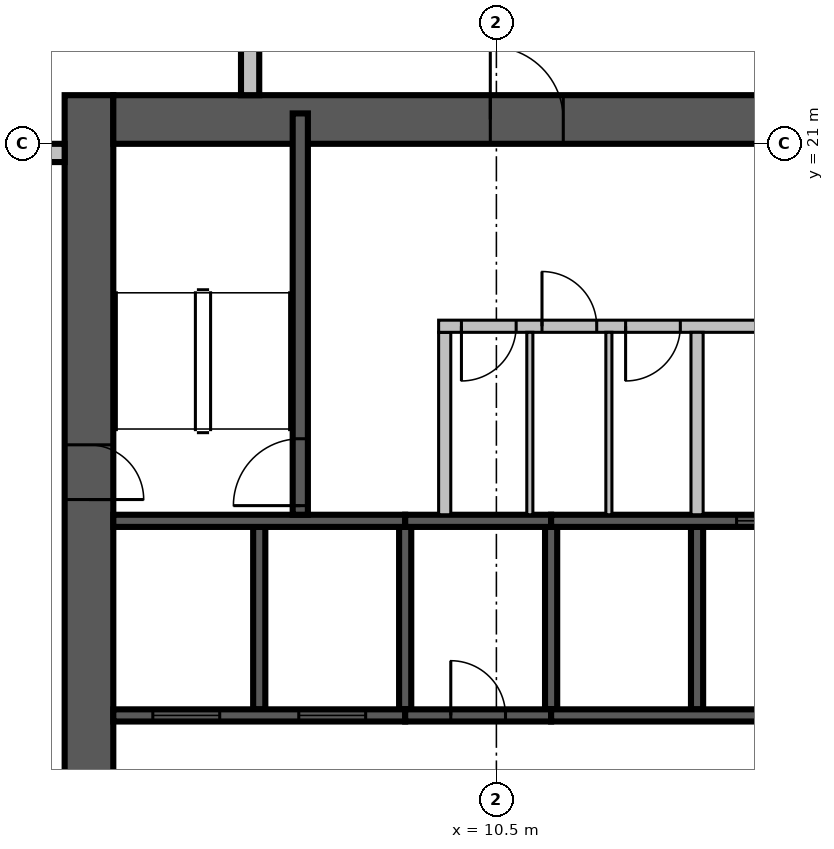
"""IFC4 building model, lengths in metres.
Left out: names, types, materials, properties, quantities, classifications, styles, units other than length and angle.
Written with IfcOpenShell. Run it as: python <this file> out.ifc"""

import sys

from ifc_helpers import new_model, si_unit, direction, frame, frame_2d, origin, place, context, subcontext, project, spatial, rectangle, extrude, source, transform, mapped, element, fill, save


model = new_model("IFC4")
c1 = context("Model", 3, precision=1e-05, world=origin(), true_north=direction((0.0, 1.0)))
c2 = subcontext(c1, "Body", "Model", "MODEL_VIEW")
j1 = project(units=[si_unit("LENGTHUNIT", "METRE"), si_unit("PLANEANGLEUNIT", "RADIAN")], contexts=[c1])
p1 = place(None, origin())
s1 = spatial("IfcSite", under=j1, at=p1, CompositionType="ELEMENT")
p2 = place(p1, origin())
s2 = spatial("IfcBuilding", under=s1, at=p2, CompositionType="ELEMENT")
p3 = place(p2, frame((0.0, 0.0, 219.6)))
s3 = spatial("IfcBuildingStorey", under=s2, at=p3, CompositionType="ELEMENT", Elevation=219.6)
m1 = source(origin(), c2, "Body", "SweptSolid", [
    extrude(rectangle(XDim=17.6, YDim=0.8, at=frame_2d((8.8, 0.0))), origin(), (0.0, 0.0, 1.0), 3.8),
])
p4 = place(p3, frame((3.8, 4.2, 0.0), z_axis=(0.0, 0.0, 1.0), x_axis=(0.0, 1.0, 0.0)))
e1 = element("IfcWall", 1, at=p4, inside=s3, PredefinedType="SHEAR", context=c2, shape_type="MappedRepresentation", body=[
    mapped(m1, transform((0.0, 0.0, 0.0), scale=1.0)),
])
m2 = source(origin(), c2, "Body", "SweptSolid", [
    extrude(rectangle(XDim=2.2, YDim=2.1, at=frame_2d((1.1, 1.05))), frame((0.0, 0.41, 0.0), z_axis=(0.0, -1.0, 0.0), x_axis=(1.0, 0.0, 0.0)), (0.0, 0.0, 1.0), 0.82),
])
p5 = place(p4, frame((4.2, 0.0, 0.0)))
e2 = element("IfcOpeningElement", 2, at=p5, cuts=e1, PredefinedType="OPENING", context=c2, shape_type="MappedRepresentation", body=[
    mapped(m2, transform((0.0, 0.0, 0.0), scale=1.0)),
])
m3 = source(origin(), c2, "Body", "SweptSolid", [
    extrude(rectangle(XDim=0.9, YDim=2.1, at=frame_2d((0.45, 1.05))), frame((0.0, 0.41, 0.0), z_axis=(0.0, -1.0, 0.0), x_axis=(1.0, 0.0, 0.0)), (0.0, 0.0, 1.0), 0.82),
])
p6 = place(p4, frame((10.95, 0.0, 0.0)))
e3 = element("IfcOpeningElement", 3, at=p6, cuts=e1, PredefinedType="OPENING", context=c2, shape_type="MappedRepresentation", body=[
    mapped(m3, transform((0.0, 0.0, 0.0), scale=1.0)),
])
m4 = source(origin(), c2, "Body", "SweptSolid", [
    extrude(rectangle(XDim=16.8, YDim=0.8, at=frame_2d((8.4, 0.0))), origin(), (0.0, 0.0, 1.0), 3.8),
])
p7 = place(p3, frame((4.2, 21.4, 0.0), z_axis=(0.0, 0.0, 1.0), x_axis=(1.0, 0.0, 0.0)))
e4 = element("IfcWall", 4, at=p7, inside=s3, PredefinedType="SHEAR", context=c2, shape_type="MappedRepresentation", body=[
    mapped(m4, transform((0.0, 0.0, 0.0), scale=1.0)),
])
m5 = source(origin(), c2, "Body", "SweptSolid", [
    extrude(rectangle(XDim=1.2, YDim=2.1, at=frame_2d((0.6, 1.05))), frame((0.0, 0.41, 0.0), z_axis=(0.0, -1.0, 0.0), x_axis=(1.0, 0.0, 0.0)), (0.0, 0.0, 1.0), 0.82),
])
p8 = place(p7, frame((6.2, 0.0, 0.0)))
e5 = element("IfcOpeningElement", 5, at=p8, cuts=e4, PredefinedType="OPENING", context=c2, shape_type="MappedRepresentation", body=[
    mapped(m5, transform((0.0, 0.0, 0.0), scale=1.0)),
])
m6 = source(origin(), c2, "Body", "SweptSolid", [
    extrude(rectangle(XDim=16.6, YDim=0.3, at=frame_2d((8.3, 0.0))), origin(), (0.0, 0.0, 1.0), 3.4),
])
p9 = place(p3, frame((6.45, 38.4, 0.0), z_axis=(0.0, 0.0, 1.0), x_axis=(0.0, -1.0, 0.0)))
e6 = element("IfcWall", 6, at=p9, inside=s3, PredefinedType="STANDARD", context=c2, shape_type="MappedRepresentation", body=[
    mapped(m6, transform((0.0, 0.0, 0.0), scale=1.0)),
])
m7 = source(origin(), c2, "Body", "SweptSolid", [
    extrude(rectangle(XDim=1.8, YDim=2.3, at=frame_2d((0.9, 1.15))), frame((0.0, 0.16, 0.0), z_axis=(0.0, -1.0, 0.0), x_axis=(1.0, 0.0, 0.0)), (0.0, 0.0, 1.0), 0.32),
])
p10 = place(p9, frame((1.15, 0.0, 0.6)))
e7 = element("IfcOpeningElement", 7, at=p10, cuts=e6, PredefinedType="OPENING", context=c2, shape_type="MappedRepresentation", body=[
    mapped(m7, transform((0.0, 0.0, 0.0), scale=1.0)),
])
p11 = place(p9, frame((9.438, 0.0, 0.6)))
e8 = element("IfcOpeningElement", 8, at=p11, cuts=e6, PredefinedType="OPENING", context=c2, shape_type="MappedRepresentation", body=[
    mapped(m7, transform((0.0, 0.0, 0.0), scale=1.0)),
])
m8 = source(origin(), c2, "Body", "SweptSolid", [
    extrude(rectangle(XDim=1.2, YDim=2.3, at=frame_2d((0.6, 1.15))), frame((0.0, 0.16, 0.0), z_axis=(0.0, -1.0, 0.0), x_axis=(1.0, 0.0, 0.0)), (0.0, 0.0, 1.0), 0.32),
])
p12 = place(p9, frame((14.338, 0.0, 0.6)))
e9 = element("IfcOpeningElement", 9, at=p12, cuts=e6, PredefinedType="OPENING", context=c2, shape_type="MappedRepresentation", body=[
    mapped(m8, transform((0.0, 0.0, 0.0), scale=1.0)),
])
p13 = place(p9, frame((11.887, 0.0, 0.6)))
e10 = element("IfcOpeningElement", 10, at=p13, cuts=e6, PredefinedType="OPENING", context=c2, shape_type="MappedRepresentation", body=[
    mapped(m7, transform((0.0, 0.0, 0.0), scale=1.0)),
])
m9 = source(origin(), c2, "Body", "SweptSolid", [
    extrude(rectangle(XDim=1.0, YDim=2.1, at=frame_2d((0.5, 1.05))), frame((0.0, 0.16, 0.0), z_axis=(0.0, -1.0, 0.0), x_axis=(1.0, 0.0, 0.0)), (0.0, 0.0, 1.0), 0.32),
])
p14 = place(p9, frame((5.908, 0.0, 0.0)))
e11 = element("IfcOpeningElement", 11, at=p14, cuts=e6, PredefinedType="OPENING", context=c2, shape_type="MappedRepresentation", body=[
    mapped(m9, transform((0.0, 0.0, 0.0), scale=1.0)),
])
m10 = source(origin(), c2, "Body", "SweptSolid", [
    extrude(rectangle(XDim=2.5, YDim=0.3, at=frame_2d((1.25, 0.0))), origin(), (0.0, 0.0, 1.0), 3.4),
])
p15 = place(p3, frame((3.4, 20.85, 0.0), z_axis=(0.0, 0.0, 1.0), x_axis=(-1.0, 0.0, 0.0)))
e12 = element("IfcWall", 12, at=p15, inside=s3, PredefinedType="STANDARD", context=c2, shape_type="MappedRepresentation", body=[
    mapped(m10, transform((0.0, 0.0, 0.0), scale=1.0)),
])
p16 = place(p15, frame((0.4, 0.0, 0.6)))
e13 = element("IfcOpeningElement", 13, at=p16, cuts=e12, PredefinedType="OPENING", context=c2, shape_type="MappedRepresentation", body=[
    mapped(m7, transform((0.0, 0.0, 0.0), scale=1.0)),
])
m11 = source(origin(), c2, "Body", "SweptSolid", [
    extrude(rectangle(XDim=3.0, YDim=0.2, at=frame_2d((1.5, 0.0))), origin(), (0.0, 0.0, 1.0), 3.8),
])
p17 = place(p3, frame((6.6, 11.7, 0.0), z_axis=(0.0, 0.0, 1.0), x_axis=(0.0, 1.0, 0.0)))
e14 = element("IfcWall", 14, at=p17, inside=s3, PredefinedType="SOLIDWALL", context=c2, shape_type="MappedRepresentation", body=[
    mapped(m11, transform((0.0, 0.0, 0.0), scale=1.0)),
])
m12 = source(origin(), c2, "Body", "SweptSolid", [
    extrude(rectangle(XDim=3.0, YDim=0.2, at=frame_2d((1.5, 0.0))), origin(), (0.0, 0.0, 1.0), 3.4),
])
for number, where, z_axis, x_axis in (
    (15, (9.0, 11.7, 0.0), (0.0, 0.0, 1.0), (0.0, 1.0, 0.0)),
    (16, (11.4, 11.7, 0.0), (0.0, 0.0, 1.0), (0.0, 1.0, 0.0)),
):
    element("IfcWall", number, at=place(p3, frame(where, z_axis=z_axis, x_axis=x_axis)), inside=s3, PredefinedType="SOLIDWALL", context=c2, shape_type="MappedRepresentation", body=[
        mapped(m12, transform((0.0, 0.0, 0.0), scale=1.0)),
    ])
p18 = place(p3, frame((13.8, 11.7, 0.0), z_axis=(0.0, 0.0, 1.0), x_axis=(0.0, 1.0, 0.0)))
e17 = element("IfcWall", 17, at=p18, inside=s3, PredefinedType="SOLIDWALL", context=c2, shape_type="MappedRepresentation", body=[
    mapped(m11, transform((0.0, 0.0, 0.0), scale=1.0)),
])
m13 = source(origin(), c2, "Body", "SweptSolid", [
    extrude(rectangle(XDim=4.8, YDim=0.2, at=frame_2d((2.4, 0.0))), origin(), (0.0, 0.0, 1.0), 3.8),
])
p19 = place(p3, frame((4.2, 11.6, 0.0), z_axis=(0.0, 0.0, 1.0), x_axis=(1.0, 0.0, 0.0)))
e18 = element("IfcWall", 18, at=p19, inside=s3, PredefinedType="SOLIDWALL", context=c2, shape_type="MappedRepresentation", body=[
    mapped(m13, transform((0.0, 0.0, 0.0), scale=1.0)),
])
m14 = source(origin(), c2, "Body", "SweptSolid", [
    extrude(rectangle(XDim=1.1, YDim=2.1, at=frame_2d((0.55, 1.05))), frame((0.0, 0.11, 0.0), z_axis=(0.0, -1.0, 0.0), x_axis=(1.0, 0.0, 0.0)), (0.0, 0.0, 1.0), 0.22),
])
p20 = place(p19, frame((0.65, 0.0, 0.0)))
e19 = element("IfcOpeningElement", 19, at=p20, cuts=e18, PredefinedType="OPENING", context=c2, shape_type="MappedRepresentation", body=[
    mapped(m14, transform((0.0, 0.0, 0.0), scale=1.0)),
])
p21 = place(p19, frame((3.05, 0.0, 0.0)))
e20 = element("IfcOpeningElement", 20, at=p21, cuts=e18, PredefinedType="OPENING", context=c2, shape_type="MappedRepresentation", body=[
    mapped(m14, transform((0.0, 0.0, 0.0), scale=1.0)),
])
m15 = source(origin(), c2, "Body", "SweptSolid", [
    extrude(rectangle(XDim=2.4, YDim=0.2, at=frame_2d((1.2, 0.0))), origin(), (0.0, 0.0, 1.0), 3.4),
])
p22 = place(p3, frame((9.0, 11.6, 0.0), z_axis=(0.0, 0.0, 1.0), x_axis=(1.0, 0.0, 0.0)))
e21 = element("IfcWall", 21, at=p22, inside=s3, PredefinedType="SOLIDWALL", context=c2, shape_type="MappedRepresentation", body=[
    mapped(m15, transform((0.0, 0.0, 0.0), scale=1.0)),
])
m16 = source(origin(), c2, "Body", "SweptSolid", [
    extrude(rectangle(XDim=0.9, YDim=2.1, at=frame_2d((0.45, 1.05))), frame((0.0, 0.11, 0.0), z_axis=(0.0, -1.0, 0.0), x_axis=(1.0, 0.0, 0.0)), (0.0, 0.0, 1.0), 0.22),
])
p23 = place(p22, frame((0.75, 0.0, 0.0)))
e22 = element("IfcOpeningElement", 22, at=p23, cuts=e21, PredefinedType="OPENING", context=c2, shape_type="MappedRepresentation", body=[
    mapped(m16, transform((0.0, 0.0, 0.0), scale=1.0)),
])
m17 = source(origin(), c2, "Body", "SweptSolid", [
    extrude(rectangle(XDim=9.6, YDim=0.2, at=frame_2d((4.8, 0.0))), origin(), (0.0, 0.0, 1.0), 3.8),
])
p24 = place(p3, frame((11.4, 11.6, 0.0), z_axis=(0.0, 0.0, 1.0), x_axis=(1.0, 0.0, 0.0)))
e23 = element("IfcWall", 23, at=p24, inside=s3, PredefinedType="SOLIDWALL", context=c2, shape_type="MappedRepresentation", body=[
    mapped(m17, transform((0.0, 0.0, 0.0), scale=1.0)),
])
p25 = place(p3, frame((4.2, 14.8, 0.0), z_axis=(0.0, 0.0, 1.0), x_axis=(1.0, 0.0, 0.0)))
e24 = element("IfcWall", 24, at=p25, inside=s3, PredefinedType="SOLIDWALL", context=c2, shape_type="MappedRepresentation", body=[
    mapped(m13, transform((0.0, 0.0, 0.0), scale=1.0)),
])
p26 = place(p3, frame((9.0, 14.8, 0.0), z_axis=(0.0, 0.0, 1.0), x_axis=(1.0, 0.0, 0.0)))
e25 = element("IfcWall", 25, at=p26, inside=s3, PredefinedType="SOLIDWALL", context=c2, shape_type="MappedRepresentation", body=[
    mapped(m15, transform((0.0, 0.0, 0.0), scale=1.0)),
])
p27 = place(p3, frame((11.4, 14.8, 0.0), z_axis=(0.0, 0.0, 1.0), x_axis=(1.0, 0.0, 0.0)))
e26 = element("IfcWall", 26, at=p27, inside=s3, PredefinedType="SOLIDWALL", context=c2, shape_type="MappedRepresentation", body=[
    mapped(m17, transform((0.0, 0.0, 0.0), scale=1.0)),
])
p28 = place(p27, frame((3.05, 0.0, 0.0)))
e27 = element("IfcOpeningElement", 27, at=p28, cuts=e26, PredefinedType="OPENING", context=c2, shape_type="MappedRepresentation", body=[
    mapped(m14, transform((0.0, 0.0, 0.0), scale=1.0)),
])
p29 = place(p27, frame((5.45, 0.0, 0.0)))
e28 = element("IfcOpeningElement", 28, at=p29, cuts=e26, PredefinedType="OPENING", context=c2, shape_type="MappedRepresentation", body=[
    mapped(m14, transform((0.0, 0.0, 0.0), scale=1.0)),
])
p30 = place(p27, frame((7.85, 0.0, 0.0)))
e29 = element("IfcOpeningElement", 29, at=p30, cuts=e26, PredefinedType="OPENING", context=c2, shape_type="MappedRepresentation", body=[
    mapped(m14, transform((0.0, 0.0, 0.0), scale=1.0)),
])
m18 = source(origin(), c2, "Body", "SweptSolid", [
    extrude(rectangle(XDim=6.6, YDim=0.25, at=frame_2d((3.3, 0.0))), origin(), (0.0, 0.0, 1.0), 3.4),
])
p31 = place(p3, frame((7.275, 14.9, 0.0), z_axis=(0.0, 0.0, 1.0), x_axis=(0.0, 1.0, 0.0)))
e30 = element("IfcWall", 30, at=p31, inside=s3, PredefinedType="SOLIDWALL", context=c2, shape_type="MappedRepresentation", body=[
    mapped(m18, transform((0.0, 0.0, 0.0), scale=1.0)),
])
m19 = source(origin(), c2, "Body", "SweptSolid", [
    extrude(rectangle(XDim=1.1, YDim=2.1, at=frame_2d((0.55, 1.05))), frame((0.0, 0.135, 0.0), z_axis=(0.0, -1.0, 0.0), x_axis=(1.0, 0.0, 0.0)), (0.0, 0.0, 1.0), 0.27),
])
p32 = place(p31, frame((0.15, 0.0, 0.0)))
e31 = element("IfcOpeningElement", 31, at=p32, cuts=e30, PredefinedType="OPENING", context=c2, shape_type="MappedRepresentation", body=[
    mapped(m19, transform((0.0, 0.0, 0.0), scale=1.0)),
])
m20 = source(origin(), c2, "Body", "SweptSolid", [
    extrude(rectangle(XDim=3.0, YDim=0.2, at=frame_2d((1.5, 0.0))), origin(), (0.0, 0.0, 1.0), 3.4),
])
p33 = place(p3, frame((9.65, 14.9, 0.0), z_axis=(0.0, 0.0, 1.0), x_axis=(0.0, 1.0, 0.0)))
e32 = element("IfcWall", 32, at=p33, inside=s3, PredefinedType="PARTITIONING", context=c2, shape_type="MappedRepresentation", body=[
    mapped(m20, transform((0.0, 0.0, 0.0), scale=1.0)),
])
m21 = source(origin(), c2, "Body", "SweptSolid", [
    extrude(rectangle(XDim=11.45, YDim=0.2, at=frame_2d((5.725, 0.0))), origin(), (0.0, 0.0, 1.0), 3.4),
])
p34 = place(p3, frame((9.55, 18.0, 0.0), z_axis=(0.0, 0.0, 1.0), x_axis=(1.0, 0.0, 0.0)))
e33 = element("IfcWall", 33, at=p34, inside=s3, PredefinedType="PARTITIONING", context=c2, shape_type="MappedRepresentation", body=[
    mapped(m21, transform((0.0, 0.0, 0.0), scale=1.0)),
])
p35 = place(p34, frame((0.375, 0.0, 0.0)))
e34 = element("IfcOpeningElement", 34, at=p35, cuts=e33, PredefinedType="OPENING", context=c2, shape_type="MappedRepresentation", body=[
    mapped(m16, transform((0.0, 0.0, 0.0), scale=1.0)),
])
p36 = place(p34, frame((1.7, 0.0, 0.0)))
e35 = element("IfcOpeningElement", 35, at=p36, cuts=e33, PredefinedType="OPENING", context=c2, shape_type="MappedRepresentation", body=[
    mapped(m16, transform((0.0, 0.0, 0.0), scale=1.0)),
])
p37 = place(p34, frame((3.075, 0.0, 0.0)))
e36 = element("IfcOpeningElement", 36, at=p37, cuts=e33, PredefinedType="OPENING", context=c2, shape_type="MappedRepresentation", body=[
    mapped(m16, transform((0.0, 0.0, 0.0), scale=1.0)),
])
p38 = place(p34, frame((7.35, 0.0, 0.0)))
e37 = element("IfcOpeningElement", 37, at=p38, cuts=e33, PredefinedType="OPENING", context=c2, shape_type="MappedRepresentation", body=[
    mapped(m14, transform((0.0, 0.0, 0.0), scale=1.0)),
])
p39 = place(p3, frame((13.8, 14.9, 0.0), z_axis=(0.0, 0.0, 1.0), x_axis=(0.0, 1.0, 0.0)))
e38 = element("IfcWall", 38, at=p39, inside=s3, PredefinedType="PARTITIONING", context=c2, shape_type="MappedRepresentation", body=[
    mapped(m20, transform((0.0, 0.0, 0.0), scale=1.0)),
])
m22 = source(origin(), c2, "Body", "SweptSolid", [
    extrude(rectangle(XDim=3.0, YDim=0.1, at=frame_2d((1.5, 0.0))), origin(), (0.0, 0.0, 1.0), 3.4),
])
for number, where, z_axis, x_axis in (
    (39, (11.05, 14.9, 0.0), (0.0, 0.0, 1.0), (0.0, 1.0, 0.0)),
    (40, (12.35, 14.9, 0.0), (0.0, 0.0, 1.0), (0.0, 1.0, 0.0)),
):
    element("IfcWall", number, at=place(p3, frame(where, z_axis=z_axis, x_axis=x_axis)), inside=s3, PredefinedType="PARTITIONING", context=c2, shape_type="MappedRepresentation", body=[
        mapped(m22, transform((0.0, 0.0, 0.0), scale=1.0)),
    ])
m23 = source(origin(), c2, "Body", "SweptSolid", [
    extrude(rectangle(XDim=1.1, YDim=2.1, at=frame_2d((0.55, 1.05))), frame((0.0, 0.025, 0.0), z_axis=(0.0, -1.0, 0.0), x_axis=(1.0, 0.0, 0.0)), (0.0, 0.0, 1.0), 0.05),
])
p40 = place(p20, origin())
e41 = element("IfcDoor", 41, at=p40, inside=s3, OperationType="SLIDING_TO_LEFT", PredefinedType="DOOR", context=c2, shape_type="MappedRepresentation", body=[
    mapped(m23, transform((0.0, 0.0, 0.0), scale=1.0)),
])
fill(e19, e41)
p41 = place(p21, origin())
e42 = element("IfcDoor", 42, at=p41, inside=s3, OperationType="SLIDING_TO_LEFT", PredefinedType="DOOR", context=c2, shape_type="MappedRepresentation", body=[
    mapped(m23, transform((0.0, 0.0, 0.0), scale=1.0)),
])
fill(e20, e42)
m24 = source(origin(), c2, "Body", "SweptSolid", [
    extrude(rectangle(XDim=0.9, YDim=2.1, at=frame_2d((0.45, 1.05))), frame((0.0, 0.025, 0.0), z_axis=(0.0, -1.0, 0.0), x_axis=(1.0, 0.0, 0.0)), (0.0, 0.0, 1.0), 0.05),
])
p42 = place(p23, origin())
e43 = element("IfcDoor", 43, at=p42, inside=s3, OperationType="SINGLE_SWING_LEFT", PredefinedType="DOOR", context=c2, shape_type="MappedRepresentation", body=[
    mapped(m24, transform((0.0, 0.0, 0.0), scale=1.0)),
])
fill(e22, e43)
p43 = place(p28, origin())
e44 = element("IfcDoor", 44, at=p43, inside=s3, OperationType="SLIDING_TO_LEFT", PredefinedType="DOOR", context=c2, shape_type="MappedRepresentation", body=[
    mapped(m23, transform((0.0, 0.0, 0.0), scale=1.0)),
])
fill(e27, e44)
p44 = place(p32, origin())
e45 = element("IfcDoor", 45, at=p44, inside=s3, OperationType="SINGLE_SWING_LEFT", PredefinedType="DOOR", context=c2, shape_type="MappedRepresentation", body=[
    mapped(m23, transform((0.0, 0.0, 0.0), scale=1.0)),
])
fill(e31, e45)
p45 = place(p35, origin())
e46 = element("IfcDoor", 46, at=p45, inside=s3, OperationType="SINGLE_SWING_RIGHT", PredefinedType="DOOR", context=c2, shape_type="MappedRepresentation", body=[
    mapped(m24, transform((0.0, 0.0, 0.0), scale=1.0)),
])
fill(e34, e46)
p46 = place(p36, origin())
e47 = element("IfcDoor", 47, at=p46, inside=s3, OperationType="SINGLE_SWING_LEFT", PredefinedType="DOOR", context=c2, shape_type="MappedRepresentation", body=[
    mapped(m24, transform((0.0, 0.0, 0.0), scale=1.0)),
])
fill(e35, e47)
p47 = place(p37, origin())
e48 = element("IfcDoor", 48, at=p47, inside=s3, OperationType="SINGLE_SWING_RIGHT", PredefinedType="DOOR", context=c2, shape_type="MappedRepresentation", body=[
    mapped(m24, transform((0.0, 0.0, 0.0), scale=1.0)),
])
fill(e36, e48)
m25 = source(origin(), c2, "Body", "SweptSolid", [
    extrude(rectangle(XDim=1.2, YDim=2.1, at=frame_2d((0.6, 1.05))), frame((0.0, 0.025, 0.0), z_axis=(0.0, -1.0, 0.0), x_axis=(1.0, 0.0, 0.0)), (0.0, 0.0, 1.0), 0.05),
])
p48 = place(p8, origin())
e49 = element("IfcDoor", 49, at=p48, inside=s3, OperationType="SINGLE_SWING_LEFT", PredefinedType="DOOR", context=c2, shape_type="MappedRepresentation", body=[
    mapped(m25, transform((0.0, 0.0, 0.0), scale=1.0)),
])
fill(e5, e49)
p49 = place(p6, origin())
e50 = element("IfcDoor", 50, at=p49, inside=s3, OperationType="SINGLE_SWING_RIGHT", PredefinedType="DOOR", context=c2, shape_type="MappedRepresentation", body=[
    mapped(m24, transform((0.0, 0.0, 0.0), scale=1.0)),
])
fill(e3, e50)
save(model, sys.argv[1])
